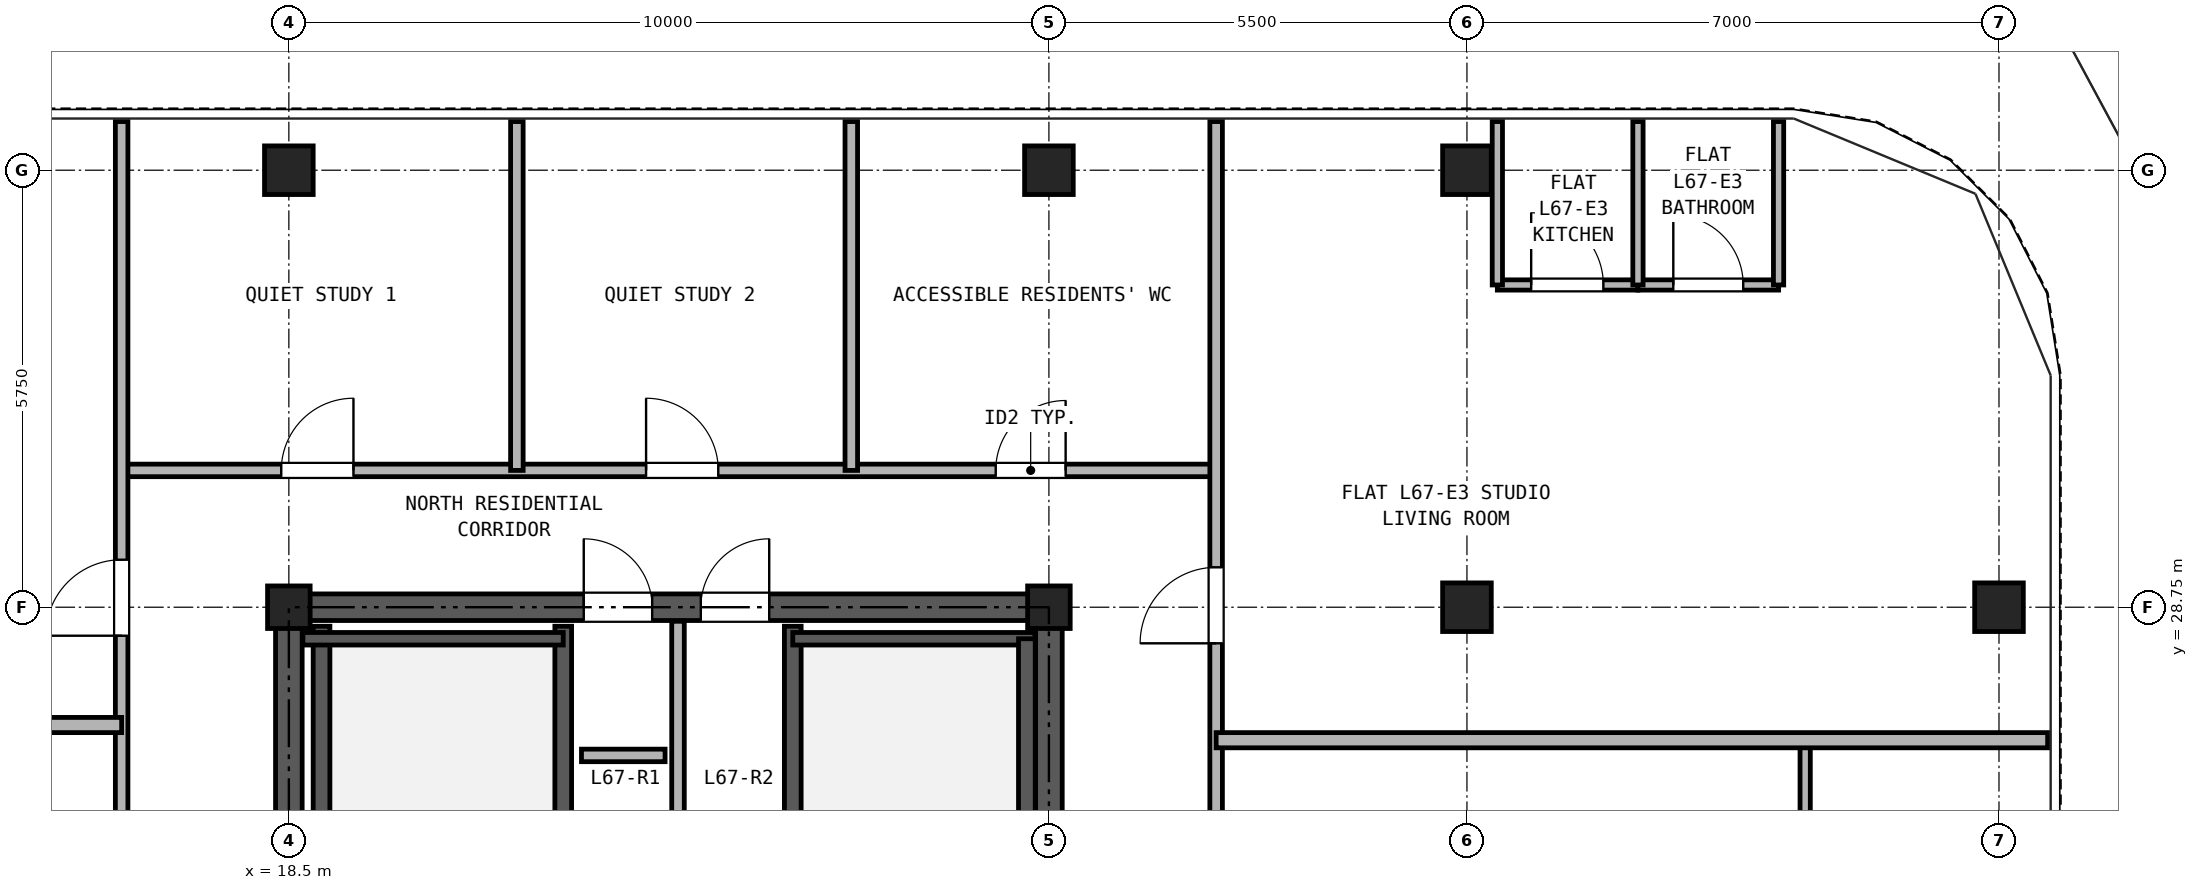
"""IFC4 building model, lengths in metres.
Left out: names, types, materials, properties, quantities, classifications, styles, units other than length and angle.
Written with IfcOpenShell. Run it as: python <this file> out.ifc"""

import sys

from ifc_helpers import new_model, si_unit, direction, frame, frame_2d, origin, origin_2d, place, context, subcontext, project, spatial, rectangle, hollow_rectangle, extrude, source, transform, mapped, element, fill, save


model = new_model("IFC4")
c1 = context("Model", 3, precision=1e-05, world=origin(), true_north=direction((0.0, 1.0)))
c2 = subcontext(c1, "Body", "Model", "MODEL_VIEW")
j1 = project(units=[si_unit("LENGTHUNIT", "METRE"), si_unit("PLANEANGLEUNIT", "RADIAN")], contexts=[c1])
p1 = place(None, origin())
s1 = spatial("IfcSite", under=j1, at=p1, CompositionType="ELEMENT")
p2 = place(p1, origin())
s2 = spatial("IfcBuilding", under=s1, at=p2, CompositionType="ELEMENT")
p3 = place(p2, frame((0.0, 0.0, 236.1)))
s3 = spatial("IfcBuildingStorey", under=s2, at=p3, CompositionType="ELEMENT", Elevation=236.1)
m1 = source(origin(), c2, "Body", "SweptSolid", [
    extrude(hollow_rectangle(XDim=0.64, YDim=0.64, WallThickness=0.035, at=origin_2d()), origin(), (0.0, 0.0, 1.0), 2.98),
])
for number, where, z_axis, x_axis in (
    (1, (18.5, 34.5, 0.0), (0.0, 0.0, 1.0), (1.0, 0.0, 0.0)),
    (2, (28.5, 34.5, 0.0), (0.0, 0.0, 1.0), (1.0, 0.0, 0.0)),
    (3, (34.0, 34.5, 0.0), (0.0, 0.0, 1.0), (1.0, 0.0, 0.0)),
    (4, (41.0, 28.75, 0.0), (0.0, 0.0, 1.0), (1.0, 0.0, 0.0)),
):
    element("IfcColumn", number, at=place(p3, frame(where, z_axis=z_axis, x_axis=x_axis)), inside=s3, PredefinedType="COLUMN", context=c2, shape_type="MappedRepresentation", body=[
        mapped(m1, transform((0.0, 0.0, 0.0), x_axis=(1.0, 0.0, 0.0), y_axis=(0.0, 1.0, 0.0), z_axis=(0.0, 0.0, 1.0), scale=1.0)),
    ])
m2 = source(origin(), c2, "Body", "SweptSolid", [
    extrude(hollow_rectangle(XDim=0.56, YDim=0.56, WallThickness=0.03, at=origin_2d()), origin(), (0.0, 0.0, 1.0), 2.98),
])
for number, where, z_axis, x_axis in (
    (5, (18.5, 28.75, 0.0), (0.0, 0.0, 1.0), (1.0, 0.0, 0.0)),
    (6, (28.5, 28.75, 0.0), (0.0, 0.0, 1.0), (1.0, 0.0, 0.0)),
):
    element("IfcColumn", number, at=place(p3, frame(where, z_axis=z_axis, x_axis=x_axis)), inside=s3, PredefinedType="COLUMN", context=c2, shape_type="MappedRepresentation", body=[
        mapped(m2, transform((0.0, 0.0, 0.0), x_axis=(1.0, 0.0, 0.0), y_axis=(0.0, 1.0, 0.0), z_axis=(0.0, 0.0, 1.0), scale=1.0)),
    ])
p4 = place(p3, frame((34.0, 28.75, 0.0), z_axis=(0.0, 0.0, 1.0), x_axis=(1.0, 0.0, 0.0)))
e7 = element("IfcColumn", 7, at=p4, inside=s3, PredefinedType="COLUMN", context=c2, shape_type="MappedRepresentation", body=[
    mapped(m1, transform((0.0, 0.0, 0.0), x_axis=(1.0, 0.0, 0.0), y_axis=(0.0, 1.0, 0.0), z_axis=(0.0, 0.0, 1.0), scale=1.0)),
])
p5 = place(p3, frame((18.325, 28.75, 0.0), z_axis=(0.0, 0.0, 1.0), x_axis=(1.0, 0.0, 0.0)))
e8 = element("IfcWall", 8, at=p5, inside=s3, PredefinedType="SHEAR", context=c2, shape_type="SweptSolid", body=[
    extrude(rectangle(XDim=10.35, YDim=0.35, at=frame_2d((5.175, 0.0))), origin(), (0.0, 0.0, 1.0), 2.98),
])
p6 = place(p5, frame((4.055, 0.0, 0.0)))
e9 = element("IfcOpeningElement", 9, at=p6, cuts=e8, PredefinedType="OPENING", context=c2, shape_type="SweptSolid", body=[
    extrude(rectangle(XDim=0.9, YDim=2.05, at=frame_2d((0.45, 1.025))), frame((0.0, 0.185, 0.0), z_axis=(0.0, -1.0, 0.0), x_axis=(1.0, 0.0, 0.0)), (0.0, 0.0, 1.0), 0.37),
])
p7 = place(p5, frame((5.595, 0.0, 0.0)))
e10 = element("IfcOpeningElement", 10, at=p7, cuts=e8, PredefinedType="OPENING", context=c2, shape_type="SweptSolid", body=[
    extrude(rectangle(XDim=0.9, YDim=2.05, at=frame_2d((0.45, 1.025))), frame((0.0, 0.185, 0.0), z_axis=(0.0, -1.0, 0.0), x_axis=(1.0, 0.0, 0.0)), (0.0, 0.0, 1.0), 0.37),
])
p8 = place(p3, frame((18.5, 11.675, 0.0), z_axis=(0.0, 0.0, 1.0), x_axis=(0.0, 1.0, 0.0)))
e11 = element("IfcWall", 11, at=p8, inside=s3, PredefinedType="SHEAR", context=c2, shape_type="SweptSolid", body=[
    extrude(rectangle(XDim=16.9, YDim=0.35, at=frame_2d((8.45, 0.0))), origin(), (0.0, 0.0, 1.0), 2.98),
])
p9 = place(p8, frame((7.475, 0.0, 0.0)))
e12 = element("IfcOpeningElement", 12, at=p9, cuts=e11, PredefinedType="OPENING", context=c2, shape_type="SweptSolid", body=[
    extrude(rectangle(XDim=1.15, YDim=2.2, at=frame_2d((0.575, 1.1))), frame((0.0, 0.185, 0.0), z_axis=(0.0, -1.0, 0.0), x_axis=(1.0, 0.0, 0.0)), (0.0, 0.0, 1.0), 0.37),
])
p10 = place(p3, frame((28.5, 11.675, 0.0), z_axis=(0.0, 0.0, 1.0), x_axis=(0.0, 1.0, 0.0)))
e13 = element("IfcWall", 13, at=p10, inside=s3, PredefinedType="SHEAR", context=c2, shape_type="SweptSolid", body=[
    extrude(rectangle(XDim=16.9, YDim=0.35, at=frame_2d((8.45, 0.0))), origin(), (0.0, 0.0, 1.0), 2.98),
])
p11 = place(p10, frame((7.475, 0.0, 0.0)))
e14 = element("IfcOpeningElement", 14, at=p11, cuts=e13, PredefinedType="OPENING", context=c2, shape_type="SweptSolid", body=[
    extrude(rectangle(XDim=1.15, YDim=2.2, at=frame_2d((0.575, 1.1))), frame((0.0, 0.185, 0.0), z_axis=(0.0, -1.0, 0.0), x_axis=(1.0, 0.0, 0.0)), (0.0, 0.0, 1.0), 0.37),
])
for number, where, z_axis, x_axis in (
    (15, (18.93, 21.39, 0.0), (0.0, 0.0, 1.0), (0.0, 1.0, 0.0)),
    (16, (22.11, 21.39, 0.0), (0.0, 0.0, 1.0), (0.0, 1.0, 0.0)),
    (17, (25.13, 21.39, 0.0), (0.0, 0.0, 1.0), (0.0, 1.0, 0.0)),
):
    element("IfcWall", number, at=place(p3, frame(where, z_axis=z_axis, x_axis=x_axis)), inside=s3, PredefinedType="SOLIDWALL", context=c2, shape_type="SweptSolid", body=[
        extrude(rectangle(XDim=7.11, YDim=0.22, at=frame_2d((3.555, 0.0))), origin(), (0.0, 0.0, 1.0), 2.98),
    ])
p12 = place(p3, frame((18.685, 28.335, 0.0), z_axis=(0.0, 0.0, 1.0), x_axis=(1.0, 0.0, 0.0)))
e18 = element("IfcWall", 18, at=p12, inside=s3, PredefinedType="PARTITIONING", context=c2, shape_type="SweptSolid", body=[
    extrude(rectangle(XDim=3.425, YDim=0.165, at=frame_2d((1.712, 0.0))), origin(), (0.0, 0.0, 1.0), 2.98),
])
p13 = place(p3, frame((25.13, 28.335, 0.0), z_axis=(0.0, 0.0, 1.0), x_axis=(1.0, 0.0, 0.0)))
e19 = element("IfcWall", 19, at=p13, inside=s3, PredefinedType="PARTITIONING", context=c2, shape_type="SweptSolid", body=[
    extrude(rectangle(XDim=3.185, YDim=0.165, at=frame_2d((1.593, 0.0))), origin(), (0.0, 0.0, 1.0), 2.98),
])
p14 = place(p3, frame((28.21, 21.39, 0.0), z_axis=(0.0, 0.0, 1.0), x_axis=(0.0, 1.0, 0.0)))
e20 = element("IfcWall", 20, at=p14, inside=s3, PredefinedType="SOLIDWALL", context=c2, shape_type="SweptSolid", body=[
    extrude(rectangle(XDim=6.945, YDim=0.22, at=frame_2d((3.473, 0.0))), origin(), (0.0, 0.0, 1.0), 2.98),
])
p15 = place(p3, frame((23.62, 24.4, 0.0), z_axis=(0.0, 0.0, 1.0), x_axis=(0.0, 1.0, 0.0)))
e21 = element("IfcWall", 21, at=p15, inside=s3, PredefinedType="PARTITIONING", context=c2, shape_type="SweptSolid", body=[
    extrude(rectangle(XDim=4.165, YDim=0.165, at=frame_2d((2.083, 0.0))), origin(), (0.0, 0.0, 1.0), 2.98),
])
p16 = place(p3, frame((16.3, 30.55, 0.0), z_axis=(0.0, 0.0, 1.0), x_axis=(1.0, 0.0, 0.0)))
e22 = element("IfcWall", 22, at=p16, inside=s3, PredefinedType="PARTITIONING", context=c2, shape_type="SweptSolid", body=[
    extrude(rectangle(XDim=14.4, YDim=0.165, at=frame_2d((7.2, 0.0))), origin(), (0.0, 0.0, 1.0), 2.98),
])
p17 = place(p16, frame((2.1, 0.0, 0.0)))
e23 = element("IfcOpeningElement", 23, at=p17, cuts=e22, PredefinedType="OPENING", context=c2, shape_type="SweptSolid", body=[
    extrude(rectangle(XDim=0.95, YDim=2.15, at=frame_2d((0.475, 1.075))), frame((0.0, 0.093, 0.0), z_axis=(0.0, -1.0, 0.0), x_axis=(1.0, 0.0, 0.0)), (0.0, 0.0, 1.0), 0.185),
])
p18 = place(p16, frame((6.9, 0.0, 0.0)))
e24 = element("IfcOpeningElement", 24, at=p18, cuts=e22, PredefinedType="OPENING", context=c2, shape_type="SweptSolid", body=[
    extrude(rectangle(XDim=0.95, YDim=2.15, at=frame_2d((0.475, 1.075))), frame((0.0, 0.093, 0.0), z_axis=(0.0, -1.0, 0.0), x_axis=(1.0, 0.0, 0.0)), (0.0, 0.0, 1.0), 0.185),
])
p19 = place(p16, frame((11.5, 0.0, 0.0)))
e25 = element("IfcOpeningElement", 25, at=p19, cuts=e22, PredefinedType="OPENING", context=c2, shape_type="SweptSolid", body=[
    extrude(rectangle(XDim=0.92, YDim=2.1, at=frame_2d((0.46, 1.05))), frame((0.0, 0.093, 0.0), z_axis=(0.0, -1.0, 0.0), x_axis=(1.0, 0.0, 0.0)), (0.0, 0.0, 1.0), 0.185),
])
p20 = place(p3, frame((16.3, 11.45, 0.0), z_axis=(0.0, 0.0, 1.0), x_axis=(0.0, 1.0, 0.0)))
e26 = element("IfcWall", 26, at=p20, inside=s3, PredefinedType="PARTITIONING", context=c2, shape_type="SweptSolid", body=[
    extrude(rectangle(XDim=23.69, YDim=0.165, at=frame_2d((11.845, 0.0))), origin(), (0.0, 0.0, 1.0), 2.98),
])
p21 = place(p20, frame((3.275, 0.0, 0.0)))
e27 = element("IfcOpeningElement", 27, at=p21, cuts=e26, PredefinedType="OPENING", context=c2, shape_type="SweptSolid", body=[
    extrude(rectangle(XDim=1.0, YDim=2.15, at=frame_2d((0.5, 1.075))), frame((0.0, 0.093, 0.0), z_axis=(0.0, -1.0, 0.0), x_axis=(1.0, 0.0, 0.0)), (0.0, 0.0, 1.0), 0.185),
])
p22 = place(p20, frame((11.15, 0.0, 0.0)))
e28 = element("IfcOpeningElement", 28, at=p22, cuts=e26, PredefinedType="OPENING", context=c2, shape_type="SweptSolid", body=[
    extrude(rectangle(XDim=1.0, YDim=2.15, at=frame_2d((0.5, 1.075))), frame((0.0, 0.093, 0.0), z_axis=(0.0, -1.0, 0.0), x_axis=(1.0, 0.0, 0.0)), (0.0, 0.0, 1.0), 0.185),
])
p23 = place(p20, frame((16.925, 0.0, 0.0)))
e29 = element("IfcOpeningElement", 29, at=p23, cuts=e26, PredefinedType="OPENING", context=c2, shape_type="SweptSolid", body=[
    extrude(rectangle(XDim=1.0, YDim=2.15, at=frame_2d((0.5, 1.075))), frame((0.0, 0.093, 0.0), z_axis=(0.0, -1.0, 0.0), x_axis=(1.0, 0.0, 0.0)), (0.0, 0.0, 1.0), 0.185),
])
p24 = place(p3, frame((30.7, 11.45, 0.0), z_axis=(0.0, 0.0, 1.0), x_axis=(0.0, 1.0, 0.0)))
e30 = element("IfcWall", 30, at=p24, inside=s3, PredefinedType="PARTITIONING", context=c2, shape_type="SweptSolid", body=[
    extrude(rectangle(XDim=23.69, YDim=0.165, at=frame_2d((11.845, 0.0))), origin(), (0.0, 0.0, 1.0), 2.98),
])
p25 = place(p24, frame((3.025, 0.0, 0.0)))
e31 = element("IfcOpeningElement", 31, at=p25, cuts=e30, PredefinedType="OPENING", context=c2, shape_type="SweptSolid", body=[
    extrude(rectangle(XDim=1.0, YDim=2.15, at=frame_2d((0.5, 1.075))), frame((0.0, 0.093, 0.0), z_axis=(0.0, -1.0, 0.0), x_axis=(1.0, 0.0, 0.0)), (0.0, 0.0, 1.0), 0.185),
])
p26 = place(p24, frame((10.8, 0.0, 0.0)))
e32 = element("IfcOpeningElement", 32, at=p26, cuts=e30, PredefinedType="OPENING", context=c2, shape_type="SweptSolid", body=[
    extrude(rectangle(XDim=1.0, YDim=2.15, at=frame_2d((0.5, 1.075))), frame((0.0, 0.093, 0.0), z_axis=(0.0, -1.0, 0.0), x_axis=(1.0, 0.0, 0.0)), (0.0, 0.0, 1.0), 0.185),
])
p27 = place(p24, frame((16.825, 0.0, 0.0)))
e33 = element("IfcOpeningElement", 33, at=p27, cuts=e30, PredefinedType="OPENING", context=c2, shape_type="SweptSolid", body=[
    extrude(rectangle(XDim=1.0, YDim=2.15, at=frame_2d((0.5, 1.075))), frame((0.0, 0.093, 0.0), z_axis=(0.0, -1.0, 0.0), x_axis=(1.0, 0.0, 0.0)), (0.0, 0.0, 1.0), 0.185),
])
p28 = place(p3, frame((5.36, 27.2, 0.0), z_axis=(0.0, 0.0, 1.0), x_axis=(1.0, 0.0, 0.0)))
e34 = element("IfcWall", 34, at=p28, inside=s3, PredefinedType="PARTITIONING", context=c2, shape_type="SweptSolid", body=[
    extrude(rectangle(XDim=10.94, YDim=0.2, at=frame_2d((5.47, 0.0))), origin(), (0.0, 0.0, 1.0), 2.98),
])
p29 = place(p3, frame((38.45, 22.5, 0.0), z_axis=(0.0, 0.0, 1.0), x_axis=(0.0, 1.0, 0.0)))
e35 = element("IfcWall", 35, at=p29, inside=s3, PredefinedType="PARTITIONING", context=c2, shape_type="SweptSolid", body=[
    extrude(rectangle(XDim=4.5, YDim=0.135, at=frame_2d((2.25, 0.0))), origin(), (0.0, 0.0, 1.0), 2.98),
])
p30 = place(p29, frame((1.77, 0.0, 0.0)))
e36 = element("IfcOpeningElement", 36, at=p30, cuts=e35, PredefinedType="OPENING", context=c2, shape_type="SweptSolid", body=[
    extrude(rectangle(XDim=0.95, YDim=2.15, at=frame_2d((0.475, 1.075))), frame((0.0, 0.077, 0.0), z_axis=(0.0, -1.0, 0.0), x_axis=(1.0, 0.0, 0.0)), (0.0, 0.0, 1.0), 0.155),
])
p31 = place(p3, frame((30.7, 27.0, 0.0), z_axis=(0.0, 0.0, 1.0), x_axis=(1.0, 0.0, 0.0)))
e37 = element("IfcWall", 37, at=p31, inside=s3, PredefinedType="PARTITIONING", context=c2, shape_type="SweptSolid", body=[
    extrude(rectangle(XDim=10.94, YDim=0.2, at=frame_2d((5.47, 0.0))), origin(), (0.0, 0.0, 1.0), 2.98),
])
p32 = place(p3, frame((34.4, 32.99, 0.0), z_axis=(0.0, 0.0, 1.0), x_axis=(1.0, 0.0, 0.0)))
e38 = element("IfcWall", 38, at=p32, inside=s3, PredefinedType="PARTITIONING", context=c2, shape_type="SweptSolid", body=[
    extrude(rectangle(XDim=1.85, YDim=0.135, at=frame_2d((0.925, 0.0))), origin(), (0.0, 0.0, 1.0), 2.98),
])
p33 = place(p32, frame((0.445, 0.0, 0.0)))
e39 = element("IfcOpeningElement", 39, at=p33, cuts=e38, PredefinedType="OPENING", context=c2, shape_type="SweptSolid", body=[
    extrude(rectangle(XDim=0.95, YDim=2.15, at=frame_2d((0.475, 1.075))), frame((0.0, 0.077, 0.0), z_axis=(0.0, -1.0, 0.0), x_axis=(1.0, 0.0, 0.0)), (0.0, 0.0, 1.0), 0.155),
])
p34 = place(p3, frame((36.25, 32.99, 0.0), z_axis=(0.0, 0.0, 1.0), x_axis=(1.0, 0.0, 0.0)))
e40 = element("IfcWall", 40, at=p34, inside=s3, PredefinedType="PARTITIONING", context=c2, shape_type="SweptSolid", body=[
    extrude(rectangle(XDim=1.85, YDim=0.135, at=frame_2d((0.925, 0.0))), origin(), (0.0, 0.0, 1.0), 2.98),
])
p35 = place(p34, frame((0.465, 0.0, 0.0)))
e41 = element("IfcOpeningElement", 41, at=p35, cuts=e40, PredefinedType="OPENING", context=c2, shape_type="SweptSolid", body=[
    extrude(rectangle(XDim=0.92, YDim=2.1, at=frame_2d((0.46, 1.05))), frame((0.0, 0.077, 0.0), z_axis=(0.0, -1.0, 0.0), x_axis=(1.0, 0.0, 0.0)), (0.0, 0.0, 1.0), 0.155),
])
for number, where, z_axis, x_axis in (
    (42, (34.4, 32.99, 0.0), (0.0, 0.0, 1.0), (0.0, 1.0, 0.0)),
    (43, (36.25, 32.99, 0.0), (0.0, 0.0, 1.0), (0.0, 1.0, 0.0)),
    (44, (38.1, 32.99, 0.0), (0.0, 0.0, 1.0), (0.0, 1.0, 0.0)),
):
    element("IfcWall", number, at=place(p3, frame(where, z_axis=z_axis, x_axis=x_axis)), inside=s3, PredefinedType="PARTITIONING", context=c2, shape_type="SweptSolid", body=[
        extrude(rectangle(XDim=2.15, YDim=0.135, at=frame_2d((1.075, 0.0))), origin(), (0.0, 0.0, 1.0), 2.98),
    ])
for number, where, z_axis, x_axis in (
    (45, (21.5, 30.55, 0.0), (0.0, 0.0, 1.0), (0.0, 1.0, 0.0)),
    (46, (25.9, 30.55, 0.0), (0.0, 0.0, 1.0), (0.0, 1.0, 0.0)),
):
    element("IfcWall", number, at=place(p3, frame(where, z_axis=z_axis, x_axis=x_axis)), inside=s3, PredefinedType="PARTITIONING", context=c2, shape_type="SweptSolid", body=[
        extrude(rectangle(XDim=4.59, YDim=0.165, at=frame_2d((2.295, 0.0))), origin(), (0.0, 0.0, 1.0), 2.98),
    ])
p36 = place(p3, frame((22.35, 26.8, 0.0), z_axis=(0.0, 0.0, 1.0), x_axis=(1.0, 0.0, 0.0)))
e47 = element("IfcWall", 47, at=p36, inside=s3, PredefinedType="PARTITIONING", context=c2, shape_type="SweptSolid", body=[
    extrude(rectangle(XDim=1.1, YDim=0.165, at=frame_2d((0.55, 0.0))), origin(), (0.0, 0.0, 1.0), 2.98),
])
p37 = place(p6, origin())
e48 = element("IfcDoor", 48, at=p37, inside=s3, OperationType="SINGLE_SWING_LEFT", PredefinedType="DOOR", context=c2, shape_type="SweptSolid", body=[
    extrude(rectangle(XDim=0.9, YDim=2.05, at=frame_2d((0.45, 1.025))), frame((0.0, 0.025, 0.0), z_axis=(0.0, -1.0, 0.0), x_axis=(1.0, 0.0, 0.0)), (0.0, 0.0, 1.0), 0.05),
])
fill(e9, e48)
p38 = place(p7, origin())
e49 = element("IfcDoor", 49, at=p38, inside=s3, OperationType="SINGLE_SWING_RIGHT", PredefinedType="DOOR", context=c2, shape_type="SweptSolid", body=[
    extrude(rectangle(XDim=0.9, YDim=2.05, at=frame_2d((0.45, 1.025))), frame((0.0, 0.025, 0.0), z_axis=(0.0, -1.0, 0.0), x_axis=(1.0, 0.0, 0.0)), (0.0, 0.0, 1.0), 0.05),
])
fill(e10, e49)
p39 = place(p23, origin())
e50 = element("IfcDoor", 50, at=p39, inside=s3, OperationType="SINGLE_SWING_LEFT", PredefinedType="DOOR", context=c2, shape_type="SweptSolid", body=[
    extrude(rectangle(XDim=1.0, YDim=2.15, at=frame_2d((0.5, 1.075))), frame((0.0, 0.025, 0.0), z_axis=(0.0, -1.0, 0.0), x_axis=(1.0, 0.0, 0.0)), (0.0, 0.0, 1.0), 0.05),
])
fill(e29, e50)
p40 = place(p33, frame((0.95, 0.0, 0.0), z_axis=(0.0, 0.0, 1.0), x_axis=(-1.0, 0.0, 0.0)))
e51 = element("IfcDoor", 51, at=p40, inside=s3, OperationType="SINGLE_SWING_LEFT", PredefinedType="DOOR", context=c2, shape_type="SweptSolid", body=[
    extrude(rectangle(XDim=0.95, YDim=2.15, at=frame_2d((0.475, 1.075))), frame((0.0, 0.025, 0.0), z_axis=(0.0, -1.0, 0.0), x_axis=(1.0, 0.0, 0.0)), (0.0, 0.0, 1.0), 0.05),
])
fill(e39, e51)
p41 = place(p35, frame((0.92, 0.0, 0.0), z_axis=(0.0, 0.0, 1.0), x_axis=(-1.0, 0.0, 0.0)))
e52 = element("IfcDoor", 52, at=p41, inside=s3, OperationType="SINGLE_SWING_LEFT", PredefinedType="DOOR", context=c2, shape_type="SweptSolid", body=[
    extrude(rectangle(XDim=0.92, YDim=2.1, at=frame_2d((0.46, 1.05))), frame((0.0, 0.025, 0.0), z_axis=(0.0, -1.0, 0.0), x_axis=(1.0, 0.0, 0.0)), (0.0, 0.0, 1.0), 0.05),
])
fill(e41, e52)
p42 = place(p27, frame((1.0, 0.0, 0.0), z_axis=(0.0, 0.0, 1.0), x_axis=(-1.0, 0.0, 0.0)))
e53 = element("IfcDoor", 53, at=p42, inside=s3, OperationType="SINGLE_SWING_LEFT", PredefinedType="DOOR", context=c2, shape_type="SweptSolid", body=[
    extrude(rectangle(XDim=1.0, YDim=2.15, at=frame_2d((0.5, 1.075))), frame((0.0, 0.025, 0.0), z_axis=(0.0, -1.0, 0.0), x_axis=(1.0, 0.0, 0.0)), (0.0, 0.0, 1.0), 0.05),
])
fill(e33, e53)
p43 = place(p17, origin())
e54 = element("IfcDoor", 54, at=p43, inside=s3, OperationType="SINGLE_SWING_RIGHT", PredefinedType="DOOR", context=c2, shape_type="SweptSolid", body=[
    extrude(rectangle(XDim=0.95, YDim=2.15, at=frame_2d((0.475, 1.075))), frame((0.0, 0.025, 0.0), z_axis=(0.0, -1.0, 0.0), x_axis=(1.0, 0.0, 0.0)), (0.0, 0.0, 1.0), 0.05),
])
fill(e23, e54)
p44 = place(p18, origin())
e55 = element("IfcDoor", 55, at=p44, inside=s3, OperationType="SINGLE_SWING_LEFT", PredefinedType="DOOR", context=c2, shape_type="SweptSolid", body=[
    extrude(rectangle(XDim=0.95, YDim=2.15, at=frame_2d((0.475, 1.075))), frame((0.0, 0.025, 0.0), z_axis=(0.0, -1.0, 0.0), x_axis=(1.0, 0.0, 0.0)), (0.0, 0.0, 1.0), 0.05),
])
fill(e24, e55)
p45 = place(p19, origin())
e56 = element("IfcDoor", 56, at=p45, inside=s3, OperationType="SINGLE_SWING_RIGHT", PredefinedType="DOOR", context=c2, shape_type="SweptSolid", body=[
    extrude(rectangle(XDim=0.92, YDim=2.1, at=frame_2d((0.46, 1.05))), frame((0.0, 0.025, 0.0), z_axis=(0.0, -1.0, 0.0), x_axis=(1.0, 0.0, 0.0)), (0.0, 0.0, 1.0), 0.05),
])
fill(e25, e56)
save(model, sys.argv[1])
